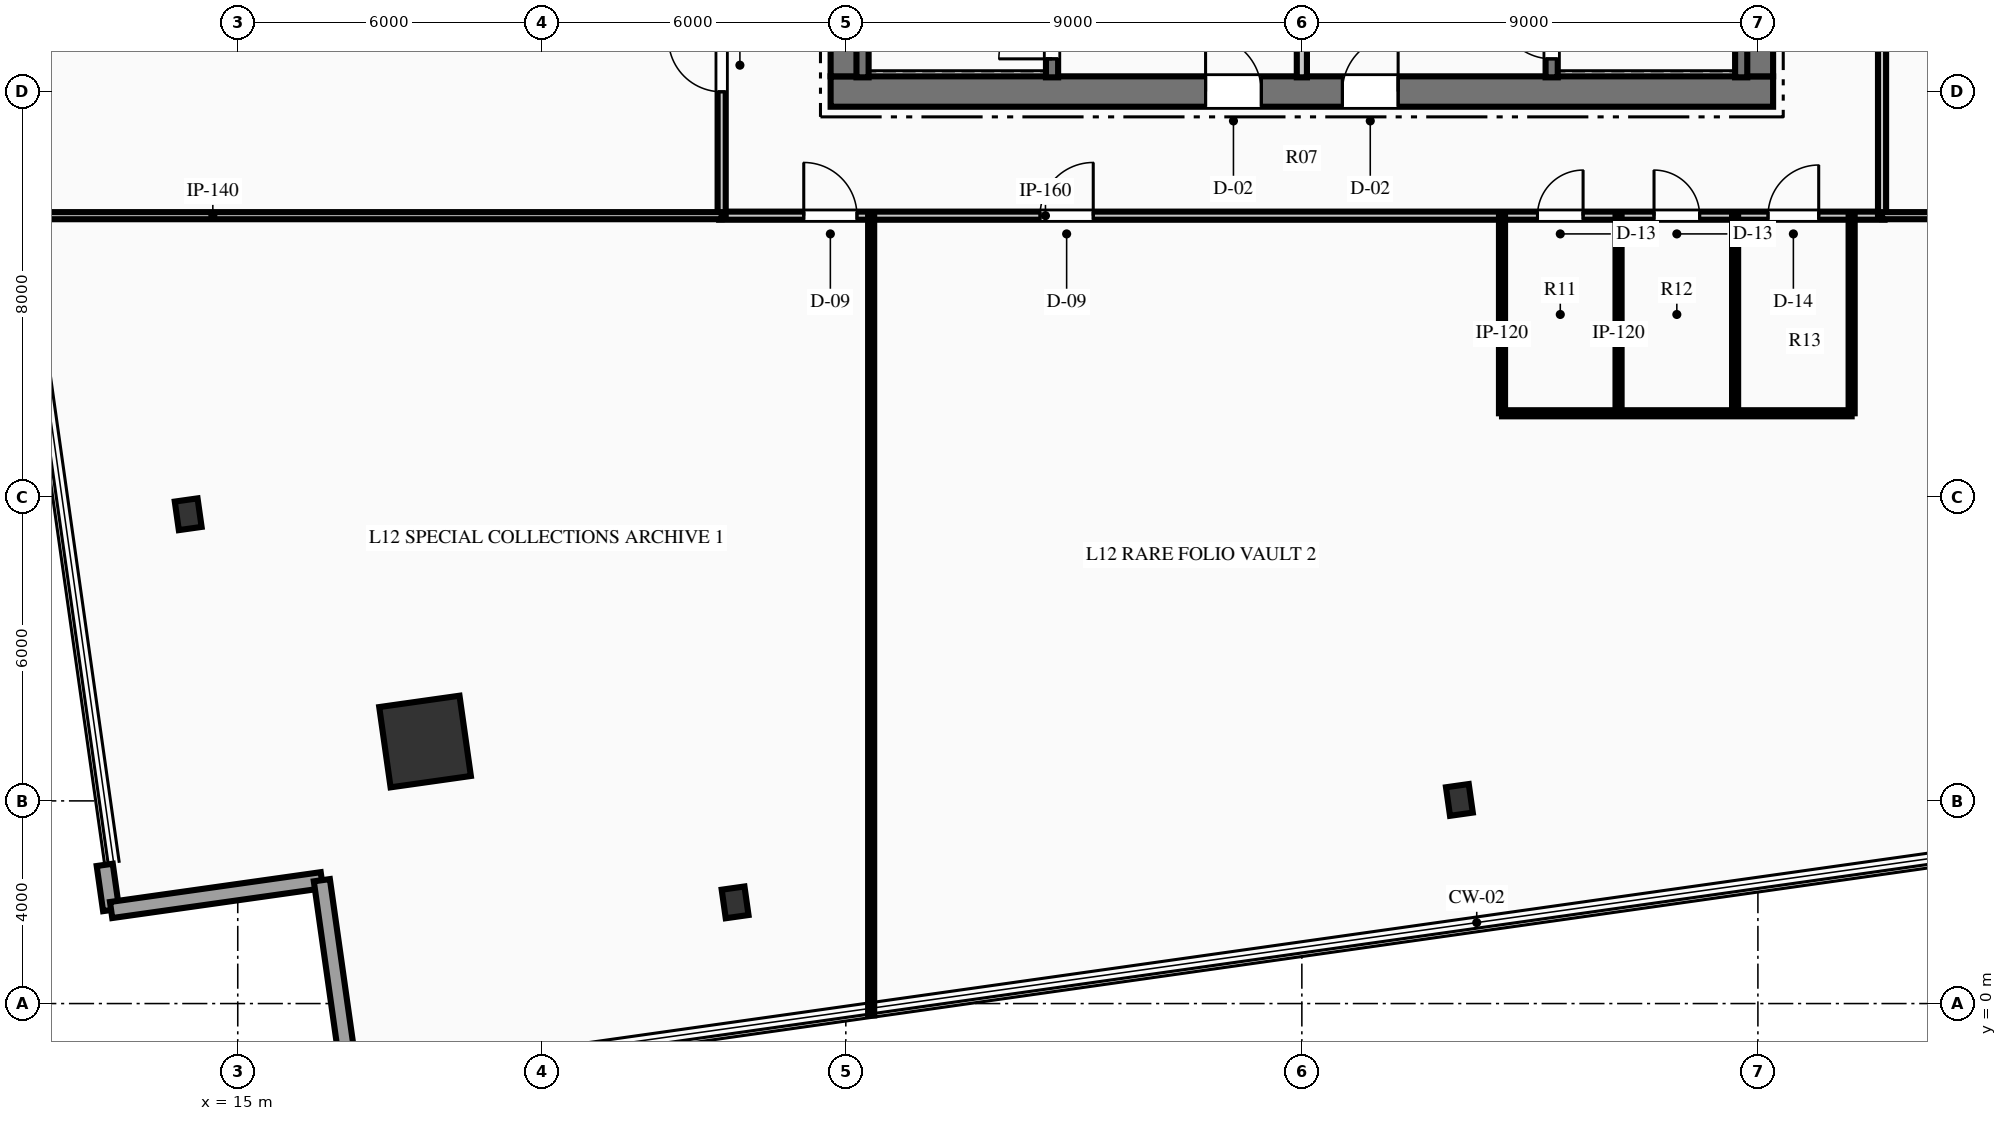
"""IFC4 building model, lengths in metres.
Left out: names, types, materials, properties, quantities, classifications, styles, units other than length and angle.
Written with IfcOpenShell. Run it as: python <this file> out.ifc"""

import sys

from ifc_helpers import new_model, si_unit, direction, frame, frame_2d, origin, origin_2d, place, context, subcontext, project, spatial, rectangle, hollow_rectangle, i_section, extrude, element, fill, save


model = new_model("IFC4")
c1 = context("Model", 3, precision=1e-05, world=origin(), true_north=direction((0.0, 1.0)))
c2 = subcontext(c1, "Body", "Model", "MODEL_VIEW")
j1 = project(units=[si_unit("LENGTHUNIT", "METRE"), si_unit("PLANEANGLEUNIT", "RADIAN")], contexts=[c1])
p1 = place(None, origin())
s1 = spatial("IfcSite", under=j1, at=p1, CompositionType="ELEMENT")
p2 = place(p1, origin())
s2 = spatial("IfcBuilding", under=s1, at=p2, CompositionType="ELEMENT")
p3 = place(p2, frame((0.0, 0.0, 55.2)))
s3 = spatial("IfcBuildingStorey", under=s2, at=p3, CompositionType="ELEMENT", Elevation=55.2)
p4 = place(p3, frame((26.7, 18.0, 0.0), z_axis=(0.0, 0.0, 1.0), x_axis=(1.0, 0.0, 0.0)))
e1 = element("IfcWall", 1, at=p4, inside=s3, PredefinedType="SHEAR", context=c2, shape_type="SweptSolid", body=[
    extrude(rectangle(XDim=18.6, YDim=0.6, at=frame_2d((9.3, 0.0))), origin(), (0.0, 0.0, 1.0), 3.75),
])
p5 = place(p4, frame((7.4, 0.0, 0.0)))
e2 = element("IfcOpeningElement", 2, at=p5, cuts=e1, PredefinedType="OPENING", context=c2, shape_type="SweptSolid", body=[
    extrude(rectangle(XDim=1.1, YDim=2.15, at=frame_2d((0.55, 1.075))), frame((0.0, 0.31, 0.0), z_axis=(0.0, -1.0, 0.0), x_axis=(1.0, 0.0, 0.0)), (0.0, 0.0, 1.0), 0.62),
])
p6 = place(p4, frame((10.1, 0.0, 0.0)))
e3 = element("IfcOpeningElement", 3, at=p6, cuts=e1, PredefinedType="OPENING", context=c2, shape_type="SweptSolid", body=[
    extrude(rectangle(XDim=1.1, YDim=2.15, at=frame_2d((0.55, 1.075))), frame((0.0, 0.31, 0.0), z_axis=(0.0, -1.0, 0.0), x_axis=(1.0, 0.0, 0.0)), (0.0, 0.0, 1.0), 0.62),
])
p7 = place(p3, frame((27.0, 18.3, 0.0), z_axis=(0.0, 0.0, 1.0), x_axis=(0.0, 1.0, 0.0)))
e4 = element("IfcWall", 4, at=p7, inside=s3, PredefinedType="SHEAR", context=c2, shape_type="SweptSolid", body=[
    extrude(rectangle(XDim=15.4, YDim=0.6, at=frame_2d((7.7, 0.0))), origin(), (0.0, 0.0, 1.0), 3.75),
])
p8 = place(p7, frame((9.94, 0.0, 0.0)))
e5 = element("IfcOpeningElement", 5, at=p8, cuts=e4, PredefinedType="OPENING", context=c2, shape_type="SweptSolid", body=[
    extrude(rectangle(XDim=1.4, YDim=2.2, at=frame_2d((0.7, 1.1))), frame((0.0, 0.31, 0.0), z_axis=(0.0, -1.0, 0.0), x_axis=(1.0, 0.0, 0.0)), (0.0, 0.0, 1.0), 0.62),
])
p9 = place(p3, frame((45.0, 18.3, 0.0), z_axis=(0.0, 0.0, 1.0), x_axis=(0.0, 1.0, 0.0)))
e6 = element("IfcWall", 6, at=p9, inside=s3, PredefinedType="SHEAR", context=c2, shape_type="SweptSolid", body=[
    extrude(rectangle(XDim=15.4, YDim=0.6, at=frame_2d((7.7, 0.0))), origin(), (0.0, 0.0, 1.0), 3.75),
])
p10 = place(p9, frame((9.94, 0.0, 0.0)))
e7 = element("IfcOpeningElement", 7, at=p10, cuts=e6, PredefinedType="OPENING", context=c2, shape_type="SweptSolid", body=[
    extrude(rectangle(XDim=1.4, YDim=2.2, at=frame_2d((0.7, 1.1))), frame((0.0, 0.31, 0.0), z_axis=(0.0, -1.0, 0.0), x_axis=(1.0, 0.0, 0.0)), (0.0, 0.0, 1.0), 0.62),
])
p11 = place(p3, frame((31.07, 18.28, 0.0), z_axis=(0.0, 0.0, 1.0), x_axis=(0.0, 1.0, 0.0)))
e8 = element("IfcWall", 8, at=p11, inside=s3, PredefinedType="SHEAR", context=c2, shape_type="SweptSolid", body=[
    extrude(rectangle(XDim=8.26, YDim=0.24, at=frame_2d((4.13, 0.0))), origin(), (0.0, 0.0, 1.0), 3.75),
])
p12 = place(p11, frame((0.365, 0.0, 0.0)))
e9 = element("IfcOpeningElement", 9, at=p12, cuts=e8, PredefinedType="OPENING", context=c2, shape_type="SweptSolid", body=[
    extrude(rectangle(XDim=1.05, YDim=2.15, at=frame_2d((0.525, 1.075))), frame((0.0, 0.13, 0.0), z_axis=(0.0, -1.0, 0.0), x_axis=(1.0, 0.0, 0.0)), (0.0, 0.0, 1.0), 0.26),
])
p13 = place(p3, frame((27.33, 18.28, 0.0), z_axis=(0.0, 0.0, 1.0), x_axis=(0.0, 1.0, 0.0)))
e10 = element("IfcWall", 10, at=p13, inside=s3, PredefinedType="SHEAR", context=c2, shape_type="SweptSolid", body=[
    extrude(rectangle(XDim=8.26, YDim=0.24, at=frame_2d((4.13, 0.0))), origin(), (0.0, 0.0, 1.0), 3.75),
])
p14 = place(p3, frame((40.93, 18.28, 0.0), z_axis=(0.0, 0.0, 1.0), x_axis=(0.0, 1.0, 0.0)))
e11 = element("IfcWall", 11, at=p14, inside=s3, PredefinedType="SHEAR", context=c2, shape_type="SweptSolid", body=[
    extrude(rectangle(XDim=8.26, YDim=0.24, at=frame_2d((4.13, 0.0))), origin(), (0.0, 0.0, 1.0), 3.75),
])
p15 = place(p14, frame((0.365, 0.0, 0.0)))
e12 = element("IfcOpeningElement", 12, at=p15, cuts=e11, PredefinedType="OPENING", context=c2, shape_type="SweptSolid", body=[
    extrude(rectangle(XDim=1.05, YDim=2.15, at=frame_2d((0.525, 1.075))), frame((0.0, 0.13, 0.0), z_axis=(0.0, -1.0, 0.0), x_axis=(1.0, 0.0, 0.0)), (0.0, 0.0, 1.0), 0.26),
])
p16 = place(p3, frame((44.67, 18.28, 0.0), z_axis=(0.0, 0.0, 1.0), x_axis=(0.0, 1.0, 0.0)))
e13 = element("IfcWall", 13, at=p16, inside=s3, PredefinedType="SHEAR", context=c2, shape_type="SweptSolid", body=[
    extrude(rectangle(XDim=8.26, YDim=0.24, at=frame_2d((4.13, 0.0))), origin(), (0.0, 0.0, 1.0), 3.75),
])
p17 = place(p3, frame((18.696, 5.172, 0.0), z_axis=(0.0, 0.0, 1.0), x_axis=(0.990146240249, 0.140037219771, 0.0)))
e14 = element("IfcColumn", 14, at=p17, inside=s3, PredefinedType="COLUMN", context=c2, shape_type="SweptSolid", body=[
    extrude(hollow_rectangle(XDim=1.6, YDim=1.6, WallThickness=0.08, at=origin_2d()), origin(), (0.0, 0.0, 1.0), 3.75),
])
for number, where, z_axis, x_axis in (
    (15, (24.815, 1.997, 0.0), (0.0, 0.0, 1.0), (0.99, 0.14, 0.0)),
    (16, (39.109, 4.019, 0.0), (0.0, 0.0, 1.0), (0.99, 0.14, 0.0)),
    (17, (14.022, 9.657, 0.0), (0.0, 0.0, 1.0), (0.99, 0.14, 0.0)),
):
    element("IfcColumn", number, at=place(p3, frame(where, z_axis=z_axis, x_axis=x_axis)), inside=s3, PredefinedType="COLUMN", context=c2, shape_type="SweptSolid", body=[
        extrude(i_section(OverallWidth=0.454, OverallDepth=0.569, WebThickness=0.078, FlangeThickness=0.125, at=origin_2d()), origin(), (0.0, 0.0, 1.0), 3.75),
    ])
p18 = place(p3, frame((12.501, 1.846, 0.0), z_axis=(0.0, 0.0, 1.0), x_axis=(-0.139978021702, 0.990154610877, 0.0)))
e18 = element("IfcWall", 18, at=p18, inside=s3, PredefinedType="STANDARD", context=c2, shape_type="SweptSolid", body=[
    extrude(rectangle(XDim=0.9, YDim=0.32, at=frame_2d((0.45, 0.0))), origin(), (0.0, 0.0, 1.0), 3.44),
])
for number, where, z_axis, x_axis in (
    (19, (16.659, 2.434, 0.0), (0.0, 0.0, 1.0), (-0.99, -0.14, 0.0)),
    (20, (17.248, -1.724, 0.0), (0.0, 0.0, 1.0), (-0.14, 0.99, 0.0)),
):
    element("IfcWall", number, at=place(p3, frame(where, z_axis=z_axis, x_axis=x_axis)), inside=s3, PredefinedType="STANDARD", context=c2, shape_type="SweptSolid", body=[
        extrude(rectangle(XDim=4.2, YDim=0.32, at=frame_2d((2.1, 0.0))), origin(), (0.0, 0.0, 1.0), 3.44),
    ])
p19 = place(p3, frame((36.0, 18.28, 0.0), z_axis=(0.0, 0.0, 1.0), x_axis=(0.0, 1.0, 0.0)))
e21 = element("IfcWall", 21, at=p19, inside=s3, PredefinedType="PARTITIONING", context=c2, shape_type="SweptSolid", body=[
    extrude(rectangle(XDim=3.77, YDim=0.2, at=frame_2d((1.885, 0.0))), origin(), (0.0, 0.0, 1.0), 3.44),
])
p20 = place(p3, frame((24.5, 15.55, 0.0), z_axis=(0.0, 0.0, 1.0), x_axis=(1.0, 0.0, 0.0)))
e22 = element("IfcWall", 22, at=p20, inside=s3, PredefinedType="PARTITIONING", context=c2, shape_type="SweptSolid", body=[
    extrude(rectangle(XDim=23.0, YDim=0.16, at=frame_2d((11.5, 0.0))), origin(), (0.0, 0.0, 1.0), 3.44),
])
p21 = place(p20, frame((16.15, 0.0, 0.0)))
e23 = element("IfcOpeningElement", 23, at=p21, cuts=e22, PredefinedType="OPENING", context=c2, shape_type="SweptSolid", body=[
    extrude(rectangle(XDim=0.9, YDim=2.15, at=frame_2d((0.45, 1.075))), frame((0.0, 0.09, 0.0), z_axis=(0.0, -1.0, 0.0), x_axis=(1.0, 0.0, 0.0)), (0.0, 0.0, 1.0), 0.18),
])
p22 = place(p20, frame((18.45, 0.0, 0.0)))
e24 = element("IfcOpeningElement", 24, at=p22, cuts=e22, PredefinedType="OPENING", context=c2, shape_type="SweptSolid", body=[
    extrude(rectangle(XDim=0.9, YDim=2.15, at=frame_2d((0.45, 1.075))), frame((0.0, 0.09, 0.0), z_axis=(0.0, -1.0, 0.0), x_axis=(1.0, 0.0, 0.0)), (0.0, 0.0, 1.0), 0.18),
])
p23 = place(p20, frame((20.7, 0.0, 0.0)))
e25 = element("IfcOpeningElement", 25, at=p23, cuts=e22, PredefinedType="OPENING", context=c2, shape_type="SweptSolid", body=[
    extrude(rectangle(XDim=1.0, YDim=2.15, at=frame_2d((0.5, 1.075))), frame((0.0, 0.09, 0.0), z_axis=(0.0, -1.0, 0.0), x_axis=(1.0, 0.0, 0.0)), (0.0, 0.0, 1.0), 0.18),
])
p24 = place(p20, frame((1.67, 0.0, 0.0)))
e26 = element("IfcOpeningElement", 26, at=p24, cuts=e22, PredefinedType="OPENING", context=c2, shape_type="SweptSolid", body=[
    extrude(rectangle(XDim=1.05, YDim=2.15, at=frame_2d((0.525, 1.075))), frame((0.0, 0.09, 0.0), z_axis=(0.0, -1.0, 0.0), x_axis=(1.0, 0.0, 0.0)), (0.0, 0.0, 1.0), 0.18),
])
p25 = place(p20, frame((6.333, 0.0, 0.0)))
e27 = element("IfcOpeningElement", 27, at=p25, cuts=e22, PredefinedType="OPENING", context=c2, shape_type="SweptSolid", body=[
    extrude(rectangle(XDim=1.05, YDim=2.15, at=frame_2d((0.525, 1.075))), frame((0.0, 0.09, 0.0), z_axis=(0.0, -1.0, 0.0), x_axis=(1.0, 0.0, 0.0)), (0.0, 0.0, 1.0), 0.18),
])
p26 = place(p3, frame((24.55, 15.55, 0.0), z_axis=(0.0, 0.0, 1.0), x_axis=(0.0, 1.0, 0.0)))
e28 = element("IfcWall", 28, at=p26, inside=s3, PredefinedType="PARTITIONING", context=c2, shape_type="SweptSolid", body=[
    extrude(rectangle(XDim=20.9, YDim=0.16, at=frame_2d((10.45, 0.0))), origin(), (0.0, 0.0, 1.0), 3.44),
])
p27 = place(p26, frame((2.445, 0.0, 0.0)))
e29 = element("IfcOpeningElement", 29, at=p27, cuts=e28, PredefinedType="OPENING", context=c2, shape_type="SweptSolid", body=[
    extrude(rectangle(XDim=1.05, YDim=2.15, at=frame_2d((0.525, 1.075))), frame((0.0, 0.09, 0.0), z_axis=(0.0, -1.0, 0.0), x_axis=(1.0, 0.0, 0.0)), (0.0, 0.0, 1.0), 0.18),
])
p28 = place(p26, frame((12.829, 0.0, 0.0)))
e30 = element("IfcOpeningElement", 30, at=p28, cuts=e28, PredefinedType="OPENING", context=c2, shape_type="SweptSolid", body=[
    extrude(rectangle(XDim=1.05, YDim=2.15, at=frame_2d((0.525, 1.075))), frame((0.0, 0.09, 0.0), z_axis=(0.0, -1.0, 0.0), x_axis=(1.0, 0.0, 0.0)), (0.0, 0.0, 1.0), 0.18),
])
p29 = place(p26, frame((16.307, 0.0, 0.0)))
e31 = element("IfcOpeningElement", 31, at=p29, cuts=e28, PredefinedType="OPENING", context=c2, shape_type="SweptSolid", body=[
    extrude(rectangle(XDim=1.05, YDim=2.15, at=frame_2d((0.525, 1.075))), frame((0.0, 0.09, 0.0), z_axis=(0.0, -1.0, 0.0), x_axis=(1.0, 0.0, 0.0)), (0.0, 0.0, 1.0), 0.18),
])
p30 = place(p3, frame((47.45, 15.55, 0.0), z_axis=(0.0, 0.0, 1.0), x_axis=(0.0, 1.0, 0.0)))
e32 = element("IfcWall", 32, at=p30, inside=s3, PredefinedType="PARTITIONING", context=c2, shape_type="SweptSolid", body=[
    extrude(rectangle(XDim=20.9, YDim=0.16, at=frame_2d((10.45, 0.0))), origin(), (0.0, 0.0, 1.0), 3.44),
])
p31 = place(p30, frame((14.975, 0.0, 0.0)))
e33 = element("IfcOpeningElement", 33, at=p31, cuts=e32, PredefinedType="OPENING", context=c2, shape_type="SweptSolid", body=[
    extrude(rectangle(XDim=0.95, YDim=2.15, at=frame_2d((0.475, 1.075))), frame((0.0, 0.09, 0.0), z_axis=(0.0, -1.0, 0.0), x_axis=(1.0, 0.0, 0.0)), (0.0, 0.0, 1.0), 0.18),
])
p32 = place(p30, frame((5.54, 0.0, 0.0)))
e34 = element("IfcOpeningElement", 34, at=p32, cuts=e32, PredefinedType="OPENING", context=c2, shape_type="SweptSolid", body=[
    extrude(rectangle(XDim=1.05, YDim=2.15, at=frame_2d((0.525, 1.075))), frame((0.0, 0.09, 0.0), z_axis=(0.0, -1.0, 0.0), x_axis=(1.0, 0.0, 0.0)), (0.0, 0.0, 1.0), 0.18),
])
p33 = place(p30, frame((9.791, 0.0, 0.0)))
e35 = element("IfcOpeningElement", 35, at=p33, cuts=e32, PredefinedType="OPENING", context=c2, shape_type="SweptSolid", body=[
    extrude(rectangle(XDim=1.05, YDim=2.15, at=frame_2d((0.525, 1.075))), frame((0.0, 0.09, 0.0), z_axis=(0.0, -1.0, 0.0), x_axis=(1.0, 0.0, 0.0)), (0.0, 0.0, 1.0), 0.18),
])
for number, where, z_axis, x_axis in (
    (36, (39.95, 11.65, 0.0), (0.0, 0.0, 1.0), (0.0, 1.0, 0.0)),
    (37, (42.25, 11.65, 0.0), (0.0, 0.0, 1.0), (0.0, 1.0, 0.0)),
    (38, (44.55, 11.65, 0.0), (0.0, 0.0, 1.0), (0.0, 1.0, 0.0)),
    (39, (46.85, 11.65, 0.0), (0.0, 0.0, 1.0), (0.0, 1.0, 0.0)),
):
    element("IfcWall", number, at=place(p3, frame(where, z_axis=z_axis, x_axis=x_axis)), inside=s3, PredefinedType="PARTITIONING", context=c2, shape_type="SweptSolid", body=[
        extrude(rectangle(XDim=3.9, YDim=0.12, at=frame_2d((1.95, 0.0))), origin(), (0.0, 0.0, 1.0), 3.44),
    ])
p34 = place(p3, frame((39.95, 11.65, 0.0), z_axis=(0.0, 0.0, 1.0), x_axis=(1.0, 0.0, 0.0)))
e40 = element("IfcWall", 40, at=p34, inside=s3, PredefinedType="PARTITIONING", context=c2, shape_type="SweptSolid", body=[
    extrude(rectangle(XDim=6.9, YDim=0.12, at=frame_2d((3.45, 0.0))), origin(), (0.0, 0.0, 1.0), 3.44),
])
p35 = place(p3, frame((10.603, 15.55, 0.0), z_axis=(0.0, 0.0, 1.0), x_axis=(1.0, 0.0, 0.0)))
e41 = element("IfcWall", 41, at=p35, inside=s3, PredefinedType="PARTITIONING", context=c2, shape_type="SweptSolid", body=[
    extrude(rectangle(XDim=13.947, YDim=0.14, at=frame_2d((6.974, 0.0))), origin(), (0.0, 0.0, 1.0), 3.44),
])
p36 = place(p3, frame((47.45, 15.55, 0.0), z_axis=(0.0, 0.0, 1.0), x_axis=(1.0, 0.0, 0.0)))
e42 = element("IfcWall", 42, at=p36, inside=s3, PredefinedType="PARTITIONING", context=c2, shape_type="SweptSolid", body=[
    extrude(rectangle(XDim=16.903, YDim=0.14, at=frame_2d((8.451, 0.0))), origin(), (0.0, 0.0, 1.0), 3.44),
])
p37 = place(p3, frame((27.5, -0.234, 0.0), z_axis=(0.0, 0.0, 1.0), x_axis=(0.0, 1.0, 0.0)))
e43 = element("IfcWall", 43, at=p37, inside=s3, PredefinedType="PARTITIONING", context=c2, shape_type="SweptSolid", body=[
    extrude(rectangle(XDim=15.784, YDim=0.12, at=frame_2d((7.892, 0.0))), origin(), (0.0, 0.0, 1.0), 3.44),
])
p38 = place(p12, origin())
e44 = element("IfcDoor", 44, at=p38, inside=s3, OperationType="SINGLE_SWING_LEFT", PredefinedType="DOOR", context=c2, shape_type="SweptSolid", body=[
    extrude(rectangle(XDim=1.05, YDim=2.15, at=frame_2d((0.525, 1.075))), frame((0.0, 0.025, 0.0), z_axis=(0.0, -1.0, 0.0), x_axis=(1.0, 0.0, 0.0)), (0.0, 0.0, 1.0), 0.05),
])
fill(e9, e44)
p39 = place(p15, origin())
e45 = element("IfcDoor", 45, at=p39, inside=s3, OperationType="SINGLE_SWING_RIGHT", PredefinedType="DOOR", context=c2, shape_type="SweptSolid", body=[
    extrude(rectangle(XDim=1.05, YDim=2.15, at=frame_2d((0.525, 1.075))), frame((0.0, 0.025, 0.0), z_axis=(0.0, -1.0, 0.0), x_axis=(1.0, 0.0, 0.0)), (0.0, 0.0, 1.0), 0.05),
])
fill(e12, e45)
p40 = place(p5, origin())
e46 = element("IfcDoor", 46, at=p40, inside=s3, OperationType="SINGLE_SWING_LEFT", PredefinedType="DOOR", context=c2, shape_type="SweptSolid", body=[
    extrude(rectangle(XDim=1.1, YDim=2.15, at=frame_2d((0.55, 1.075))), frame((0.0, 0.025, 0.0), z_axis=(0.0, -1.0, 0.0), x_axis=(1.0, 0.0, 0.0)), (0.0, 0.0, 1.0), 0.05),
])
fill(e2, e46)
p41 = place(p6, origin())
e47 = element("IfcDoor", 47, at=p41, inside=s3, OperationType="SINGLE_SWING_RIGHT", PredefinedType="DOOR", context=c2, shape_type="SweptSolid", body=[
    extrude(rectangle(XDim=1.1, YDim=2.15, at=frame_2d((0.55, 1.075))), frame((0.0, 0.025, 0.0), z_axis=(0.0, -1.0, 0.0), x_axis=(1.0, 0.0, 0.0)), (0.0, 0.0, 1.0), 0.05),
])
fill(e3, e47)
p42 = place(p21, origin())
e48 = element("IfcDoor", 48, at=p42, inside=s3, OperationType="SINGLE_SWING_RIGHT", PredefinedType="DOOR", context=c2, shape_type="SweptSolid", body=[
    extrude(rectangle(XDim=0.9, YDim=2.15, at=frame_2d((0.45, 1.075))), frame((0.0, 0.025, 0.0), z_axis=(0.0, -1.0, 0.0), x_axis=(1.0, 0.0, 0.0)), (0.0, 0.0, 1.0), 0.05),
])
fill(e23, e48)
p43 = place(p22, origin())
e49 = element("IfcDoor", 49, at=p43, inside=s3, OperationType="SINGLE_SWING_LEFT", PredefinedType="DOOR", context=c2, shape_type="SweptSolid", body=[
    extrude(rectangle(XDim=0.9, YDim=2.15, at=frame_2d((0.45, 1.075))), frame((0.0, 0.025, 0.0), z_axis=(0.0, -1.0, 0.0), x_axis=(1.0, 0.0, 0.0)), (0.0, 0.0, 1.0), 0.05),
])
fill(e24, e49)
p44 = place(p23, origin())
e50 = element("IfcDoor", 50, at=p44, inside=s3, OperationType="SINGLE_SWING_RIGHT", PredefinedType="DOOR", context=c2, shape_type="SweptSolid", body=[
    extrude(rectangle(XDim=1.0, YDim=2.15, at=frame_2d((0.5, 1.075))), frame((0.0, 0.025, 0.0), z_axis=(0.0, -1.0, 0.0), x_axis=(1.0, 0.0, 0.0)), (0.0, 0.0, 1.0), 0.05),
])
fill(e25, e50)
p45 = place(p24, origin())
e51 = element("IfcDoor", 51, at=p45, inside=s3, OperationType="SINGLE_SWING_LEFT", PredefinedType="DOOR", context=c2, shape_type="SweptSolid", body=[
    extrude(rectangle(XDim=1.05, YDim=2.15, at=frame_2d((0.525, 1.075))), frame((0.0, 0.025, 0.0), z_axis=(0.0, -1.0, 0.0), x_axis=(1.0, 0.0, 0.0)), (0.0, 0.0, 1.0), 0.05),
])
fill(e26, e51)
p46 = place(p25, origin())
e52 = element("IfcDoor", 52, at=p46, inside=s3, OperationType="SINGLE_SWING_RIGHT", PredefinedType="DOOR", context=c2, shape_type="SweptSolid", body=[
    extrude(rectangle(XDim=1.05, YDim=2.15, at=frame_2d((0.525, 1.075))), frame((0.0, 0.025, 0.0), z_axis=(0.0, -1.0, 0.0), x_axis=(1.0, 0.0, 0.0)), (0.0, 0.0, 1.0), 0.05),
])
fill(e27, e52)
p47 = place(p27, origin())
e53 = element("IfcDoor", 53, at=p47, inside=s3, OperationType="SINGLE_SWING_RIGHT", PredefinedType="DOOR", context=c2, shape_type="SweptSolid", body=[
    extrude(rectangle(XDim=1.05, YDim=2.15, at=frame_2d((0.525, 1.075))), frame((0.0, 0.025, 0.0), z_axis=(0.0, -1.0, 0.0), x_axis=(1.0, 0.0, 0.0)), (0.0, 0.0, 1.0), 0.05),
])
fill(e29, e53)
save(model, sys.argv[1])
